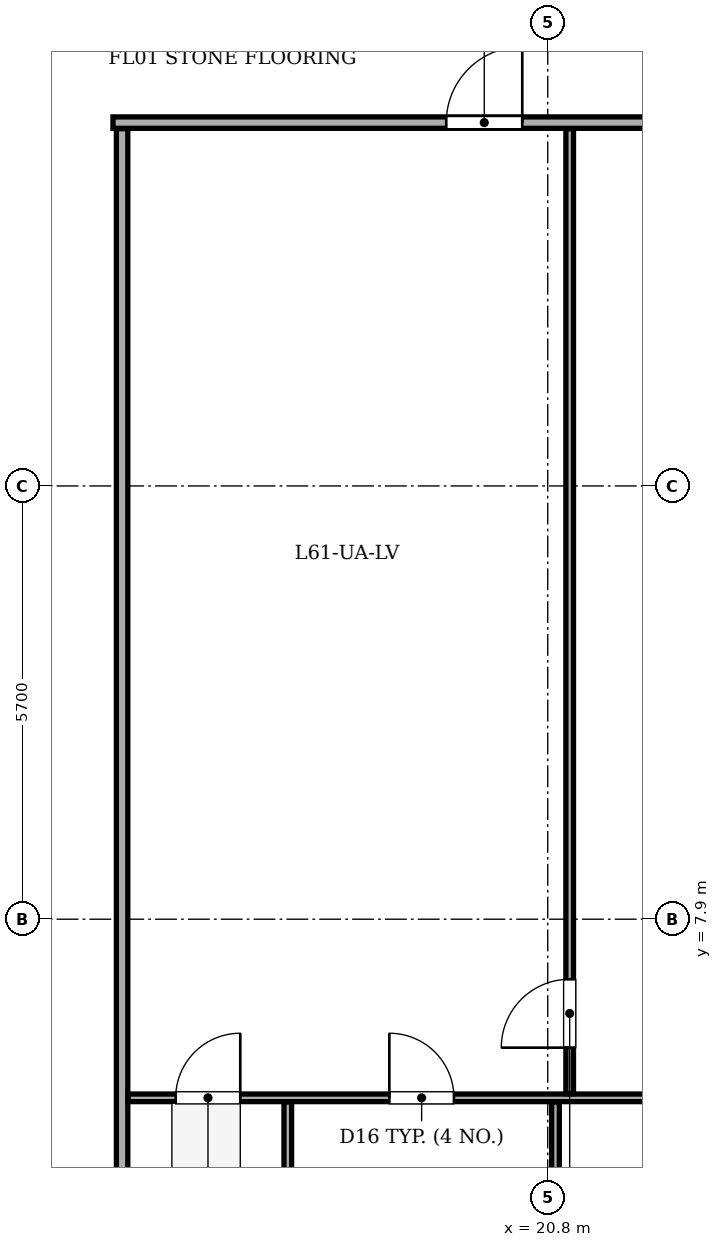
"""IFC4 building model, lengths in metres.
Left out: names, types, materials, properties, quantities, classifications, styles, units other than length and angle.
Written with IfcOpenShell. Run it as: python <this file> out.ifc"""

import sys

from ifc_helpers import new_model, si_unit, direction, frame, frame_2d, origin, place, context, subcontext, project, spatial, rectangle, extrude, element, fill, save


model = new_model("IFC4")
c1 = context("Model", 3, precision=1e-05, world=origin(), true_north=direction((0.0, 1.0)))
c2 = subcontext(c1, "Body", "Model", "MODEL_VIEW")
j1 = project(units=[si_unit("LENGTHUNIT", "METRE"), si_unit("PLANEANGLEUNIT", "RADIAN")], contexts=[c1])
p1 = place(None, origin())
s1 = spatial("IfcSite", under=j1, at=p1, CompositionType="ELEMENT")
p2 = place(p1, origin())
s2 = spatial("IfcBuilding", under=s1, at=p2, CompositionType="ELEMENT")
p3 = place(p2, frame((0.0, 0.0, 234.7)))
s3 = spatial("IfcBuildingStorey", under=s2, at=p3, CompositionType="ELEMENT", Elevation=234.7)
p4 = place(p3, frame((15.2, 2.88, 0.0), z_axis=(0.0, 0.0, 1.0), x_axis=(-0.707106781187, 0.707106781187, 0.0)))
e1 = element("IfcWall", 1, at=p4, inside=s3, PredefinedType="STANDARD", context=c2, shape_type="SweptSolid", body=[
    extrude(rectangle(XDim=6.11, YDim=0.32, at=frame_2d((3.055, 0.0))), origin(), (0.0, 0.0, 1.0), 2.725),
])
p5 = place(p4, frame((2.355, 0.0, 0.75)))
e2 = element("IfcOpeningElement", 2, at=p5, cuts=e1, PredefinedType="OPENING", context=c2, shape_type="SweptSolid", body=[
    extrude(rectangle(XDim=1.4, YDim=1.65, at=frame_2d((0.7, 0.825))), frame((0.0, 0.17, 0.0), z_axis=(0.0, -1.0, 0.0), x_axis=(1.0, 0.0, 0.0)), (0.0, 0.0, 1.0), 0.34),
])
p6 = place(p3, frame((15.08, 18.38, 0.0), z_axis=(0.0, 0.0, 1.0), x_axis=(1.0, 0.0, 0.0)))
e3 = element("IfcWall", 3, at=p6, inside=s3, PredefinedType="PARTITIONING", context=c2, shape_type="SweptSolid", body=[
    extrude(rectangle(XDim=30.02, YDim=0.15, at=frame_2d((15.01, 0.0))), origin(), (0.0, 0.0, 1.0), 3.1),
])
p7 = place(p6, frame((4.385, 0.0, 0.0)))
e4 = element("IfcOpeningElement", 4, at=p7, cuts=e3, PredefinedType="OPENING", context=c2, shape_type="SweptSolid", body=[
    extrude(rectangle(XDim=1.0, YDim=2.1, at=frame_2d((0.5, 1.05))), frame((0.0, 0.085, 0.0), z_axis=(0.0, -1.0, 0.0), x_axis=(1.0, 0.0, 0.0)), (0.0, 0.0, 1.0), 0.17),
])
p8 = place(p6, frame((14.361, 0.0, 0.0)))
e5 = element("IfcOpeningElement", 5, at=p8, cuts=e3, PredefinedType="OPENING", context=c2, shape_type="SweptSolid", body=[
    extrude(rectangle(XDim=1.0, YDim=2.1, at=frame_2d((0.5, 1.05))), frame((0.0, 0.085, 0.0), z_axis=(0.0, -1.0, 0.0), x_axis=(1.0, 0.0, 0.0)), (0.0, 0.0, 1.0), 0.17),
])
p9 = place(p6, frame((24.486, 0.0, 0.0)))
e6 = element("IfcOpeningElement", 6, at=p9, cuts=e3, PredefinedType="OPENING", context=c2, shape_type="SweptSolid", body=[
    extrude(rectangle(XDim=1.0, YDim=2.1, at=frame_2d((0.5, 1.05))), frame((0.0, 0.085, 0.0), z_axis=(0.0, -1.0, 0.0), x_axis=(1.0, 0.0, 0.0)), (0.0, 0.0, 1.0), 0.17),
])
p10 = place(p3, frame((15.2, 3.045, 0.0), z_axis=(0.0, 0.0, 1.0), x_axis=(0.0, 1.0, 0.0)))
e7 = element("IfcWall", 7, at=p10, inside=s3, PredefinedType="PARTITIONING", context=c2, shape_type="SweptSolid", body=[
    extrude(rectangle(XDim=15.255, YDim=0.15, at=frame_2d((7.627, 0.0))), origin(), (0.0, 0.0, 1.0), 3.1),
])
p11 = place(p3, frame((15.28, 5.55, 0.0), z_axis=(0.0, 0.0, 1.0), x_axis=(1.0, 0.0, 0.0)))
e8 = element("IfcWall", 8, at=p11, inside=s3, PredefinedType="PARTITIONING", context=c2, shape_type="SweptSolid", body=[
    extrude(rectangle(XDim=9.49, YDim=0.1, at=frame_2d((4.745, 0.0))), origin(), (0.0, 0.0, 1.0), 3.1),
])
p12 = place(p11, frame((0.625, 0.0, 0.0)))
e9 = element("IfcOpeningElement", 9, at=p12, cuts=e8, PredefinedType="OPENING", context=c2, shape_type="SweptSolid", body=[
    extrude(rectangle(XDim=0.85, YDim=2.05, at=frame_2d((0.425, 1.025))), frame((0.0, 0.06, 0.0), z_axis=(0.0, -1.0, 0.0), x_axis=(1.0, 0.0, 0.0)), (0.0, 0.0, 1.0), 0.12),
])
p13 = place(p11, frame((3.436, 0.0, 0.0)))
e10 = element("IfcOpeningElement", 10, at=p13, cuts=e8, PredefinedType="OPENING", context=c2, shape_type="SweptSolid", body=[
    extrude(rectangle(XDim=0.85, YDim=2.05, at=frame_2d((0.425, 1.025))), frame((0.0, 0.06, 0.0), z_axis=(0.0, -1.0, 0.0), x_axis=(1.0, 0.0, 0.0)), (0.0, 0.0, 1.0), 0.12),
])
p14 = place(p11, frame((7.046, 0.0, 0.0)))
e11 = element("IfcOpeningElement", 11, at=p14, cuts=e8, PredefinedType="OPENING", context=c2, shape_type="SweptSolid", body=[
    extrude(rectangle(XDim=0.9, YDim=2.05, at=frame_2d((0.45, 1.025))), frame((0.0, 0.06, 0.0), z_axis=(0.0, -1.0, 0.0), x_axis=(1.0, 0.0, 0.0)), (0.0, 0.0, 1.0), 0.12),
])
p15 = place(p3, frame((21.089, 5.605, 0.0), z_axis=(0.0, 0.0, 1.0), x_axis=(0.0, 1.0, 0.0)))
e12 = element("IfcWall", 12, at=p15, inside=s3, PredefinedType="PARTITIONING", context=c2, shape_type="SweptSolid", body=[
    extrude(rectangle(XDim=12.695, YDim=0.1, at=frame_2d((6.348, 0.0))), origin(), (0.0, 0.0, 1.0), 2.535),
])
p16 = place(p15, frame((0.605, 0.0, 0.0)))
e13 = element("IfcOpeningElement", 13, at=p16, cuts=e12, PredefinedType="OPENING", context=c2, shape_type="SweptSolid", body=[
    extrude(rectangle(XDim=0.9, YDim=2.05, at=frame_2d((0.45, 1.025))), frame((0.0, 0.06, 0.0), z_axis=(0.0, -1.0, 0.0), x_axis=(1.0, 0.0, 0.0)), (0.0, 0.0, 1.0), 0.12),
])
p17 = place(p3, frame((17.38, 3.045, 0.0), z_axis=(0.0, 0.0, 1.0), x_axis=(0.0, 1.0, 0.0)))
e14 = element("IfcWall", 14, at=p17, inside=s3, PredefinedType="PARTITIONING", context=c2, shape_type="SweptSolid", body=[
    extrude(rectangle(XDim=2.45, YDim=0.1, at=frame_2d((1.225, 0.0))), origin(), (0.0, 0.0, 1.0), 3.1),
])
p18 = place(p3, frame((20.902, 3.045, 0.0), z_axis=(0.0, 0.0, 1.0), x_axis=(0.0, 1.0, 0.0)))
e15 = element("IfcWall", 15, at=p18, inside=s3, PredefinedType="PARTITIONING", context=c2, shape_type="SweptSolid", body=[
    extrude(rectangle(XDim=2.45, YDim=0.1, at=frame_2d((1.225, 0.0))), origin(), (0.0, 0.0, 1.0), 2.535),
])
p19 = place(p7, origin())
e16 = element("IfcDoor", 16, at=p19, inside=s3, OperationType="SINGLE_SWING_RIGHT", PredefinedType="DOOR", context=c2, shape_type="SweptSolid", body=[
    extrude(rectangle(XDim=1.0, YDim=2.1, at=frame_2d((0.5, 1.05))), frame((0.0, 0.025, 0.0), z_axis=(0.0, -1.0, 0.0), x_axis=(1.0, 0.0, 0.0)), (0.0, 0.0, 1.0), 0.05),
])
fill(e4, e16)
p20 = place(p16, origin())
e17 = element("IfcDoor", 17, at=p20, inside=s3, OperationType="SINGLE_SWING_LEFT", PredefinedType="DOOR", context=c2, shape_type="SweptSolid", body=[
    extrude(rectangle(XDim=0.9, YDim=2.05, at=frame_2d((0.45, 1.025))), frame((0.0, 0.025, 0.0), z_axis=(0.0, -1.0, 0.0), x_axis=(1.0, 0.0, 0.0)), (0.0, 0.0, 1.0), 0.05),
])
fill(e13, e17)
p21 = place(p12, origin())
e18 = element("IfcDoor", 18, at=p21, inside=s3, OperationType="SINGLE_SWING_RIGHT", PredefinedType="DOOR", context=c2, shape_type="SweptSolid", body=[
    extrude(rectangle(XDim=0.85, YDim=2.05, at=frame_2d((0.425, 1.025))), frame((0.0, 0.025, 0.0), z_axis=(0.0, -1.0, 0.0), x_axis=(1.0, 0.0, 0.0)), (0.0, 0.0, 1.0), 0.05),
])
fill(e9, e18)
p22 = place(p13, origin())
e19 = element("IfcDoor", 19, at=p22, inside=s3, OperationType="SINGLE_SWING_LEFT", PredefinedType="DOOR", context=c2, shape_type="SweptSolid", body=[
    extrude(rectangle(XDim=0.85, YDim=2.05, at=frame_2d((0.425, 1.025))), frame((0.0, 0.025, 0.0), z_axis=(0.0, -1.0, 0.0), x_axis=(1.0, 0.0, 0.0)), (0.0, 0.0, 1.0), 0.05),
])
fill(e10, e19)
save(model, sys.argv[1])
